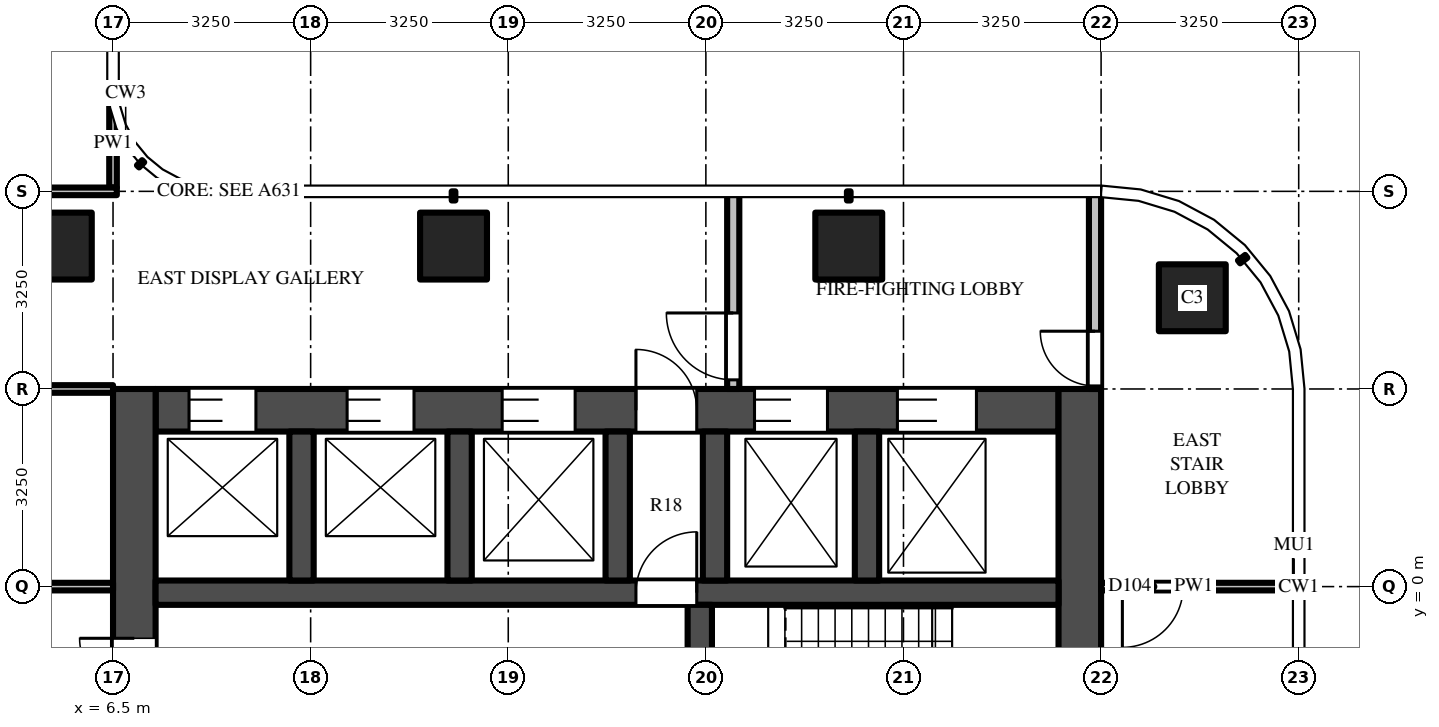
"""IFC4 building model, lengths in metres.
Left out: names, types, materials, properties, quantities, classifications, styles, units other than length and angle.
Written with IfcOpenShell. Run it as: python <this file> out.ifc"""

import sys

from ifc_helpers import new_model, si_unit, direction, frame, frame_2d, origin, origin_2d, place, context, subcontext, project, spatial, rectangle, extrude, source, transform, mapped, element, fill, save


model = new_model("IFC4")
c1 = context("Model", 3, precision=1e-05, world=origin(), true_north=direction((0.0, 1.0)))
c2 = subcontext(c1, "Body", "Model", "MODEL_VIEW")
j1 = project(units=[si_unit("LENGTHUNIT", "METRE"), si_unit("PLANEANGLEUNIT", "RADIAN")], contexts=[c1])
p1 = place(None, origin())
s1 = spatial("IfcSite", under=j1, at=p1, CompositionType="ELEMENT")
p2 = place(p1, origin())
s2 = spatial("IfcBuilding", under=s1, at=p2, CompositionType="ELEMENT")
p3 = place(p2, frame((0.0, 0.0, 244.1)))
s3 = spatial("IfcBuildingStorey", under=s2, at=p3, CompositionType="ELEMENT", Elevation=244.1)
m1 = source(origin(), c2, "Body", "SweptSolid", [
    extrude(rectangle(XDim=1.1, YDim=1.1, at=origin_2d()), origin(), (0.0, 0.0, 1.0), 3.9),
])
for number, where, z_axis, x_axis in (
    (1, (12.1, 5.6, 0.0), (0.0, 0.0, 1.0), (1.0, 0.0, 0.0)),
    (2, (18.6, 5.6, 0.0), (0.0, 0.0, 1.0), (1.0, 0.0, 0.0)),
    (3, (24.25, 4.75, 0.0), (0.0, 0.0, 1.0), (1.0, 0.0, 0.0)),
    (4, (5.6, 5.6, 0.0), (0.0, 0.0, 1.0), (1.0, 0.0, 0.0)),
):
    element("IfcColumn", number, at=place(p3, frame(where, z_axis=z_axis, x_axis=x_axis)), inside=s3, PredefinedType="COLUMN", context=c2, shape_type="MappedRepresentation", body=[
        mapped(m1, transform((0.0, 0.0, 0.0))),
    ])
m2 = source(origin(), c2, "Body", "SweptSolid", [
    extrude(rectangle(XDim=14.85, YDim=0.7, at=frame_2d((7.425, 0.0))), origin(), (0.0, 0.0, 1.0), 3.7),
])
p4 = place(p3, frame((7.2, 2.9, 0.0), z_axis=(0.0, 0.0, 1.0), x_axis=(1.0, 0.0, 0.0)))
e5 = element("IfcWall", 5, at=p4, inside=s3, PredefinedType="SHEAR", context=c2, shape_type="MappedRepresentation", body=[
    mapped(m2, transform((0.0, 0.0, 0.0))),
])
m3 = source(origin(), c2, "Body", "SweptSolid", [
    extrude(rectangle(XDim=1.1, YDim=2.1, at=frame_2d((0.55, 1.05))), frame((0.0, 0.36, 0.0), z_axis=(0.0, -1.0, 0.0), x_axis=(1.0, 0.0, 0.0)), (0.0, 0.0, 1.0), 0.72),
])
p5 = place(p4, frame((0.55, 0.0, 0.0)))
e6 = element("IfcOpeningElement", 6, at=p5, cuts=e5, PredefinedType="OPENING", context=c2, shape_type="MappedRepresentation", body=[
    mapped(m3, transform((0.0, 0.0, 0.0))),
])
p6 = place(p4, frame((3.15, 0.0, 0.0)))
e7 = element("IfcOpeningElement", 7, at=p6, cuts=e5, PredefinedType="OPENING", context=c2, shape_type="MappedRepresentation", body=[
    mapped(m3, transform((0.0, 0.0, 0.0))),
])
m4 = source(origin(), c2, "Body", "SweptSolid", [
    extrude(rectangle(XDim=1.2, YDim=2.1, at=frame_2d((0.6, 1.05))), frame((0.0, 0.36, 0.0), z_axis=(0.0, -1.0, 0.0), x_axis=(1.0, 0.0, 0.0)), (0.0, 0.0, 1.0), 0.72),
])
p7 = place(p4, frame((5.7, 0.0, 0.0)))
e8 = element("IfcOpeningElement", 8, at=p7, cuts=e5, PredefinedType="OPENING", context=c2, shape_type="MappedRepresentation", body=[
    mapped(m4, transform((0.0, 0.0, 0.0))),
])
m5 = source(origin(), c2, "Body", "SweptSolid", [
    extrude(rectangle(XDim=1.3, YDim=2.1, at=frame_2d((0.65, 1.05))), frame((0.0, 0.36, 0.0), z_axis=(0.0, -1.0, 0.0), x_axis=(1.0, 0.0, 0.0)), (0.0, 0.0, 1.0), 0.72),
])
p8 = place(p4, frame((12.2, 0.0, 0.0)))
e9 = element("IfcOpeningElement", 9, at=p8, cuts=e5, PredefinedType="OPENING", context=c2, shape_type="MappedRepresentation", body=[
    mapped(m5, transform((0.0, 0.0, 0.0))),
])
p9 = place(p4, frame((9.85, 0.0, 0.0)))
e10 = element("IfcOpeningElement", 10, at=p9, cuts=e5, PredefinedType="OPENING", context=c2, shape_type="MappedRepresentation", body=[
    mapped(m4, transform((0.0, 0.0, 0.0))),
])
m6 = source(origin(), c2, "Body", "SweptSolid", [
    extrude(rectangle(XDim=1.0, YDim=2.1, at=frame_2d((0.5, 1.05))), frame((0.0, 0.36, 0.0), z_axis=(0.0, -1.0, 0.0), x_axis=(1.0, 0.0, 0.0)), (0.0, 0.0, 1.0), 0.72),
])
p10 = place(p4, frame((7.9, 0.0, 0.0)))
e11 = element("IfcOpeningElement", 11, at=p10, cuts=e5, PredefinedType="OPENING", context=c2, shape_type="MappedRepresentation", body=[
    mapped(m6, transform((0.0, 0.0, 0.0))),
])
m7 = source(origin(), c2, "Body", "SweptSolid", [
    extrude(rectangle(XDim=9.05, YDim=0.7, at=frame_2d((4.525, 0.0))), origin(), (0.0, 0.0, 1.0), 3.7),
])
p11 = place(p3, frame((6.85, -5.8, 0.0), z_axis=(0.0, 0.0, 1.0), x_axis=(0.0, 1.0, 0.0)))
e12 = element("IfcWall", 12, at=p11, inside=s3, PredefinedType="SHEAR", context=c2, shape_type="MappedRepresentation", body=[
    mapped(m7, transform((0.0, 0.0, 0.0))),
])
m8 = source(origin(), c2, "Body", "SweptSolid", [
    extrude(rectangle(XDim=1.8, YDim=2.1, at=frame_2d((0.9, 1.05))), frame((0.0, 0.36, 0.0), z_axis=(0.0, -1.0, 0.0), x_axis=(1.0, 0.0, 0.0)), (0.0, 0.0, 1.0), 0.72),
])
p12 = place(p11, frame((3.15, 0.0, 0.0)))
e13 = element("IfcOpeningElement", 13, at=p12, cuts=e12, PredefinedType="OPENING", context=c2, shape_type="MappedRepresentation", body=[
    mapped(m8, transform((0.0, 0.0, 0.0))),
])
p13 = place(p3, frame((22.4, -5.8, 0.0), z_axis=(0.0, 0.0, 1.0), x_axis=(0.0, 1.0, 0.0)))
e14 = element("IfcWall", 14, at=p13, inside=s3, PredefinedType="SHEAR", context=c2, shape_type="MappedRepresentation", body=[
    mapped(m7, transform((0.0, 0.0, 0.0))),
])
m9 = source(origin(), c2, "Body", "SweptSolid", [
    extrude(rectangle(XDim=14.85, YDim=0.4, at=frame_2d((7.425, 0.0))), origin(), (0.0, 0.0, 1.0), 3.7),
])
p14 = place(p3, frame((7.2, -0.1, 0.0), z_axis=(0.0, 0.0, 1.0), x_axis=(1.0, 0.0, 0.0)))
e15 = element("IfcWall", 15, at=p14, inside=s3, PredefinedType="SHEAR", context=c2, shape_type="MappedRepresentation", body=[
    mapped(m9, transform((0.0, 0.0, 0.0))),
])
m10 = source(origin(), c2, "Body", "SweptSolid", [
    extrude(rectangle(XDim=1.0, YDim=2.1, at=frame_2d((0.5, 1.05))), frame((0.0, 0.21, 0.0), z_axis=(0.0, -1.0, 0.0), x_axis=(1.0, 0.0, 0.0)), (0.0, 0.0, 1.0), 0.42),
])
p15 = place(p14, frame((7.9, 0.0, 0.0)))
e16 = element("IfcOpeningElement", 16, at=p15, cuts=e15, PredefinedType="OPENING", context=c2, shape_type="MappedRepresentation", body=[
    mapped(m10, transform((0.0, 0.0, 0.0))),
])
m11 = source(origin(), c2, "Body", "SweptSolid", [
    extrude(rectangle(XDim=5.5, YDim=0.4, at=frame_2d((2.75, 0.0))), origin(), (0.0, 0.0, 1.0), 3.7),
])
p16 = place(p3, frame((16.15, -5.8, 0.0), z_axis=(0.0, 0.0, 1.0), x_axis=(0.0, 1.0, 0.0)))
e17 = element("IfcWall", 17, at=p16, inside=s3, PredefinedType="SHEAR", context=c2, shape_type="MappedRepresentation", body=[
    mapped(m11, transform((0.0, 0.0, 0.0))),
])
m12 = source(origin(), c2, "Body", "SweptSolid", [
    extrude(rectangle(XDim=1.1, YDim=2.1, at=frame_2d((0.55, 1.05))), frame((0.0, 0.21, 0.0), z_axis=(0.0, -1.0, 0.0), x_axis=(1.0, 0.0, 0.0)), (0.0, 0.0, 1.0), 0.42),
])
p17 = place(p16, frame((0.725, 0.0, 0.0)))
e18 = element("IfcOpeningElement", 18, at=p17, cuts=e17, PredefinedType="OPENING", context=c2, shape_type="MappedRepresentation", body=[
    mapped(m12, transform((0.0, 0.0, 0.0))),
])
p18 = place(p16, frame((3.675, 0.0, 0.0)))
e19 = element("IfcOpeningElement", 19, at=p18, cuts=e17, PredefinedType="OPENING", context=c2, shape_type="MappedRepresentation", body=[
    mapped(m12, transform((0.0, 0.0, 0.0))),
])
m13 = source(origin(), c2, "Body", "SweptSolid", [
    extrude(rectangle(XDim=2.45, YDim=0.4, at=frame_2d((1.225, 0.0))), origin(), (0.0, 0.0, 1.0), 3.7),
])
for number, where, z_axis, x_axis in (
    (20, (9.6, 0.1, 0.0), (0.0, 0.0, 1.0), (0.0, 1.0, 0.0)),
    (21, (12.2, 0.1, 0.0), (0.0, 0.0, 1.0), (0.0, 1.0, 0.0)),
    (22, (14.8, 0.1, 0.0), (0.0, 0.0, 1.0), (0.0, 1.0, 0.0)),
    (23, (16.4, 0.1, 0.0), (0.0, 0.0, 1.0), (0.0, 1.0, 0.0)),
    (24, (18.9, 0.1, 0.0), (0.0, 0.0, 1.0), (0.0, 1.0, 0.0)),
):
    element("IfcWall", number, at=place(p3, frame(where, z_axis=z_axis, x_axis=x_axis)), inside=s3, PredefinedType="SHEAR", context=c2, shape_type="MappedRepresentation", body=[
        mapped(m13, transform((0.0, 0.0, 0.0))),
    ])
m14 = source(origin(), c2, "Body", "SweptSolid", [
    extrude(rectangle(XDim=3.25, YDim=0.2, at=frame_2d((1.625, 0.0))), origin(), (0.0, 0.0, 1.0), 3.7),
])
p19 = place(p3, frame((16.7, 3.25, 0.0), z_axis=(0.0, 0.0, 1.0), x_axis=(0.0, 1.0, 0.0)))
e25 = element("IfcWall", 25, at=p19, inside=s3, PredefinedType="PARTITIONING", context=c2, shape_type="MappedRepresentation", body=[
    mapped(m14, transform((0.0, 0.0, 0.0))),
])
m15 = source(origin(), c2, "Body", "SweptSolid", [
    extrude(rectangle(XDim=1.1, YDim=2.1, at=frame_2d((0.55, 1.05))), frame((0.0, 0.11, 0.0), z_axis=(0.0, -1.0, 0.0), x_axis=(1.0, 0.0, 0.0)), (0.0, 0.0, 1.0), 0.22),
])
p20 = place(p19, frame((0.15, 0.0, 0.0)))
e26 = element("IfcOpeningElement", 26, at=p20, cuts=e25, PredefinedType="OPENING", context=c2, shape_type="MappedRepresentation", body=[
    mapped(m15, transform((0.0, 0.0, 0.0))),
])
p21 = place(p3, frame((22.65, 3.25, 0.0), z_axis=(0.0, 0.0, 1.0), x_axis=(0.0, 1.0, 0.0)))
e27 = element("IfcWall", 27, at=p21, inside=s3, PredefinedType="PARTITIONING", context=c2, shape_type="MappedRepresentation", body=[
    mapped(m14, transform((0.0, 0.0, 0.0))),
])
m16 = source(origin(), c2, "Body", "SweptSolid", [
    extrude(rectangle(XDim=0.9, YDim=2.1, at=frame_2d((0.45, 1.05))), frame((0.0, 0.11, 0.0), z_axis=(0.0, -1.0, 0.0), x_axis=(1.0, 0.0, 0.0)), (0.0, 0.0, 1.0), 0.22),
])
p22 = place(p21, frame((0.05, 0.0, 0.0)))
e28 = element("IfcOpeningElement", 28, at=p22, cuts=e27, PredefinedType="OPENING", context=c2, shape_type="MappedRepresentation", body=[
    mapped(m16, transform((0.0, 0.0, 0.0))),
])
m17 = source(origin(), c2, "Body", "SweptSolid", [
    extrude(rectangle(XDim=1.469, YDim=0.125, at=frame_2d((0.734, 0.0))), origin(), (0.0, 0.0, 1.0), 3.7),
])
p23 = place(p3, frame((6.5, 6.562, 0.0), z_axis=(0.0, 0.0, 1.0), x_axis=(0.0, 1.0, 0.0)))
e29 = element("IfcWall", 29, at=p23, inside=s3, PredefinedType="PARTITIONING", context=c2, shape_type="MappedRepresentation", body=[
    mapped(m17, transform((0.0, 0.0, 0.0))),
])
m18 = source(origin(), c2, "Body", "SweptSolid", [
    extrude(rectangle(XDim=5.363, YDim=0.125, at=frame_2d((2.681, 0.0))), origin(), (0.0, 0.0, 1.0), 2.997),
])
p24 = place(p3, frame((6.5, 0.0, 0.0), z_axis=(0.0, 0.0, 1.0), x_axis=(-1.0, 0.0, 0.0)))
e30 = element("IfcWall", 30, at=p24, inside=s3, PredefinedType="PARTITIONING", context=c2, shape_type="MappedRepresentation", body=[
    mapped(m18, transform((0.0, 0.0, 0.0))),
])
m19 = source(origin(), c2, "Body", "SweptSolid", [
    extrude(rectangle(XDim=1.0, YDim=2.1, at=frame_2d((0.5, 1.05))), frame((0.0, 0.073, 0.0), z_axis=(0.0, -1.0, 0.0), x_axis=(1.0, 0.0, 0.0)), (0.0, 0.0, 1.0), 0.145),
])
p25 = place(p24, frame((3.95, 0.0, 0.0)))
e31 = element("IfcOpeningElement", 31, at=p25, cuts=e30, PredefinedType="OPENING", context=c2, shape_type="MappedRepresentation", body=[
    mapped(m19, transform((0.0, 0.0, 0.0))),
])
m20 = source(origin(), c2, "Body", "SweptSolid", [
    extrude(rectangle(XDim=3.05, YDim=0.125, at=frame_2d((1.525, 0.0))), origin(), (0.0, 0.0, 1.0), 2.78),
])
p26 = place(p3, frame((25.8, 0.0, 0.0), z_axis=(0.0, 0.0, 1.0), x_axis=(-1.0, 0.0, 0.0)))
e32 = element("IfcWall", 32, at=p26, inside=s3, PredefinedType="PARTITIONING", context=c2, shape_type="MappedRepresentation", body=[
    mapped(m20, transform((0.0, 0.0, 0.0))),
])
p27 = place(p26, frame((1.7, 0.0, 0.0)))
e33 = element("IfcOpeningElement", 33, at=p27, cuts=e32, PredefinedType="OPENING", context=c2, shape_type="MappedRepresentation", body=[
    mapped(m19, transform((0.0, 0.0, 0.0))),
])
p28 = place(p3, frame((1.137, 3.25, 0.0), z_axis=(0.0, 0.0, 1.0), x_axis=(1.0, 0.0, 0.0)))
e34 = element("IfcWall", 34, at=p28, inside=s3, PredefinedType="PARTITIONING", context=c2, shape_type="MappedRepresentation", body=[
    mapped(m18, transform((0.0, 0.0, 0.0))),
])
m21 = source(origin(), c2, "Body", "SweptSolid", [
    extrude(rectangle(XDim=5.425, YDim=0.125, at=frame_2d((2.712, 0.0))), origin(), (0.0, 0.0, 1.0), 2.78),
])
p29 = place(p3, frame((1.137, 6.5, 0.0), z_axis=(0.0, 0.0, 1.0), x_axis=(1.0, 0.0, 0.0)))
e35 = element("IfcWall", 35, at=p29, inside=s3, PredefinedType="PARTITIONING", context=c2, shape_type="MappedRepresentation", body=[
    mapped(m21, transform((0.0, 0.0, 0.0))),
])
p30 = place(p29, frame((0.413, 0.0, 0.0)))
e36 = element("IfcOpeningElement", 36, at=p30, cuts=e35, PredefinedType="OPENING", context=c2, shape_type="MappedRepresentation", body=[
    mapped(m19, transform((0.0, 0.0, 0.0))),
])
m22 = source(origin(), c2, "Body", "SweptSolid", [
    extrude(rectangle(XDim=1.1, YDim=2.1, at=frame_2d((0.55, 1.05))), frame((0.0, -0.275, 0.0), z_axis=(0.0, -1.0, 0.0), x_axis=(1.0, 0.0, 0.0)), (0.0, 0.0, 1.0), 0.05),
])
p31 = place(p5, origin())
e37 = element("IfcDoor", 37, at=p31, inside=s3, OperationType="DOUBLE_DOOR_SLIDING", PredefinedType="DOOR", context=c2, shape_type="MappedRepresentation", body=[
    mapped(m22, transform((0.0, 0.0, 0.0))),
])
fill(e6, e37)
p32 = place(p6, origin())
e38 = element("IfcDoor", 38, at=p32, inside=s3, OperationType="DOUBLE_DOOR_SLIDING", PredefinedType="DOOR", context=c2, shape_type="MappedRepresentation", body=[
    mapped(m22, transform((0.0, 0.0, 0.0))),
])
fill(e7, e38)
m23 = source(origin(), c2, "Body", "SweptSolid", [
    extrude(rectangle(XDim=1.2, YDim=2.1, at=frame_2d((0.6, 1.05))), frame((0.0, -0.275, 0.0), z_axis=(0.0, -1.0, 0.0), x_axis=(1.0, 0.0, 0.0)), (0.0, 0.0, 1.0), 0.05),
])
p33 = place(p7, origin())
e39 = element("IfcDoor", 39, at=p33, inside=s3, OperationType="DOUBLE_DOOR_SLIDING", PredefinedType="DOOR", context=c2, shape_type="MappedRepresentation", body=[
    mapped(m23, transform((0.0, 0.0, 0.0))),
])
fill(e8, e39)
m24 = source(origin(), c2, "Body", "SweptSolid", [
    extrude(rectangle(XDim=1.3, YDim=2.1, at=frame_2d((0.65, 1.05))), frame((0.0, -0.275, 0.0), z_axis=(0.0, -1.0, 0.0), x_axis=(1.0, 0.0, 0.0)), (0.0, 0.0, 1.0), 0.05),
])
p34 = place(p8, origin())
e40 = element("IfcDoor", 40, at=p34, inside=s3, OperationType="DOUBLE_DOOR_SLIDING", PredefinedType="DOOR", context=c2, shape_type="MappedRepresentation", body=[
    mapped(m24, transform((0.0, 0.0, 0.0))),
])
fill(e9, e40)
p35 = place(p9, origin())
e41 = element("IfcDoor", 41, at=p35, inside=s3, OperationType="DOUBLE_DOOR_SLIDING", PredefinedType="DOOR", context=c2, shape_type="MappedRepresentation", body=[
    mapped(m23, transform((0.0, 0.0, 0.0))),
])
fill(e10, e41)
m25 = source(origin(), c2, "Body", "SweptSolid", [
    extrude(rectangle(XDim=1.8, YDim=2.1, at=frame_2d((0.9, 1.05))), frame((0.0, -0.275, 0.0), z_axis=(0.0, -1.0, 0.0), x_axis=(1.0, 0.0, 0.0)), (0.0, 0.0, 1.0), 0.05),
])
p36 = place(p12, origin())
e42 = element("IfcDoor", 42, at=p36, inside=s3, OperationType="DOUBLE_DOOR_SINGLE_SWING", PredefinedType="DOOR", context=c2, shape_type="MappedRepresentation", body=[
    mapped(m25, transform((0.0, 0.0, 0.0))),
])
fill(e13, e42)
m26 = source(origin(), c2, "Body", "SweptSolid", [
    extrude(rectangle(XDim=1.0, YDim=2.1, at=frame_2d((0.5, 1.05))), frame((0.0, 0.025, 0.0), z_axis=(0.0, -1.0, 0.0), x_axis=(1.0, 0.0, 0.0)), (0.0, 0.0, 1.0), 0.05),
])
p37 = place(p15, origin())
e43 = element("IfcDoor", 43, at=p37, inside=s3, OperationType="SINGLE_SWING_RIGHT", PredefinedType="DOOR", context=c2, shape_type="MappedRepresentation", body=[
    mapped(m26, transform((0.0, 0.0, 0.0))),
])
fill(e16, e43)
m27 = source(origin(), c2, "Body", "SweptSolid", [
    extrude(rectangle(XDim=1.0, YDim=2.1, at=frame_2d((0.5, 1.05))), frame((0.0, -0.275, 0.0), z_axis=(0.0, -1.0, 0.0), x_axis=(1.0, 0.0, 0.0)), (0.0, 0.0, 1.0), 0.05),
])
p38 = place(p10, origin())
e44 = element("IfcDoor", 44, at=p38, inside=s3, OperationType="SINGLE_SWING_LEFT", PredefinedType="DOOR", context=c2, shape_type="MappedRepresentation", body=[
    mapped(m27, transform((0.0, 0.0, 0.0))),
])
fill(e11, e44)
m28 = source(origin(), c2, "Body", "SweptSolid", [
    extrude(rectangle(XDim=1.1, YDim=2.1, at=frame_2d((0.55, 1.05))), frame((0.0, 0.025, 0.0), z_axis=(0.0, -1.0, 0.0), x_axis=(1.0, 0.0, 0.0)), (0.0, 0.0, 1.0), 0.05),
])
p39 = place(p20, origin())
e45 = element("IfcDoor", 45, at=p39, inside=s3, OperationType="SINGLE_SWING_RIGHT", PredefinedType="DOOR", context=c2, shape_type="MappedRepresentation", body=[
    mapped(m28, transform((0.0, 0.0, 0.0))),
])
fill(e26, e45)
m29 = source(origin(), c2, "Body", "SweptSolid", [
    extrude(rectangle(XDim=0.9, YDim=2.1, at=frame_2d((0.45, 1.05))), frame((0.0, 0.025, 0.0), z_axis=(0.0, -1.0, 0.0), x_axis=(1.0, 0.0, 0.0)), (0.0, 0.0, 1.0), 0.05),
])
p40 = place(p22, origin())
e46 = element("IfcDoor", 46, at=p40, inside=s3, OperationType="SINGLE_SWING_RIGHT", PredefinedType="DOOR", context=c2, shape_type="MappedRepresentation", body=[
    mapped(m29, transform((0.0, 0.0, 0.0))),
])
fill(e28, e46)
p41 = place(p27, origin())
e47 = element("IfcDoor", 47, at=p41, inside=s3, OperationType="SINGLE_SWING_RIGHT", PredefinedType="DOOR", context=c2, shape_type="MappedRepresentation", body=[
    mapped(m26, transform((0.0, 0.0, 0.0))),
])
fill(e33, e47)
save(model, sys.argv[1])
